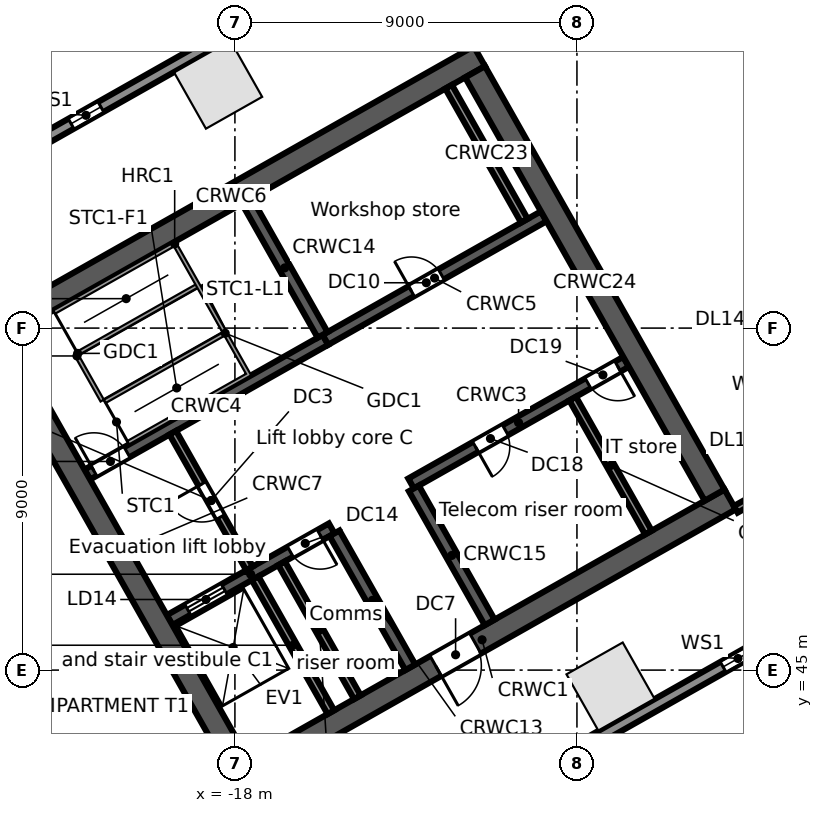
"""IFC4 building model, lengths in metres.
Left out: names, types, materials, properties, quantities, classifications, styles, units other than length and angle.
Written with IfcOpenShell. Run it as: python <this file> out.ifc"""

import sys

from ifc_helpers import new_model, si_unit, direction, frame, frame_2d, origin, origin_2d, place, context, subcontext, project, spatial, rectangle, extrude, element, fill, save


model = new_model("IFC4")
c1 = context("Model", 3, precision=1e-05, world=origin(), true_north=direction((0.0, 1.0)))
c2 = subcontext(c1, "Body", "Model", "MODEL_VIEW")
j1 = project(units=[si_unit("LENGTHUNIT", "METRE"), si_unit("PLANEANGLEUNIT", "RADIAN")], contexts=[c1])
p1 = place(None, origin())
s1 = spatial("IfcSite", under=j1, at=p1, CompositionType="ELEMENT")
p2 = place(p1, origin())
s2 = spatial("IfcBuilding", under=s1, at=p2, CompositionType="ELEMENT")
p3 = place(p2, frame((0.0, 0.0, 71.5)))
s3 = spatial("IfcBuildingStorey", under=s2, at=p3, CompositionType="ELEMENT", Elevation=71.5)
for number, where, z_axis, x_axis in (
    (1, (-18.441, 60.406, 0.0), (0.0, 0.0, 1.0), (-0.87, -0.492, 0.0)),
    (2, (-8.117, 44.568, 0.0), (0.0, 0.0, 1.0), (0.87, 0.492, 0.0)),
):
    element("IfcColumn", number, at=place(p3, frame(where, z_axis=z_axis, x_axis=x_axis)), inside=s3, PredefinedType="COLUMN", context=c2, shape_type="SweptSolid", body=[
        extrude(rectangle(XDim=1.7, YDim=1.7, at=origin_2d()), origin(), (0.0, 0.0, 1.0), 5.0),
    ])
p4 = place(p3, frame((-58.745, 38.764, 0.0), z_axis=(0.0, 0.0, 1.0), x_axis=(0.870355811726, 0.492423355453, 0.0)))
e3 = element("IfcWall", 3, at=p4, inside=s3, PredefinedType="STANDARD", context=c2, shape_type="SweptSolid", body=[
    extrude(rectangle(XDim=64.025, YDim=0.3, at=frame_2d((32.013, 0.0))), origin(), (0.0, 0.0, 1.0), 4.68),
])
p5 = place(p4, frame((60.122, 0.0, 0.6)))
e4 = element("IfcOpeningElement", 4, at=p5, cuts=e3, PredefinedType="OPENING", context=c2, shape_type="SweptSolid", body=[
    extrude(rectangle(XDim=0.9, YDim=3.2, at=frame_2d((0.45, 1.6))), frame((0.0, 0.16, 0.0), z_axis=(0.0, -1.0, 0.0), x_axis=(1.0, 0.0, 0.0)), (0.0, 0.0, 1.0), 0.32),
])
p6 = place(p4, frame((50.992, 0.0, 0.6)))
e5 = element("IfcOpeningElement", 5, at=p6, cuts=e3, PredefinedType="OPENING", context=c2, shape_type="SweptSolid", body=[
    extrude(rectangle(XDim=0.9, YDim=3.2, at=frame_2d((0.45, 1.6))), frame((0.0, 0.16, 0.0), z_axis=(0.0, -1.0, 0.0), x_axis=(1.0, 0.0, 0.0)), (0.0, 0.0, 1.0), 0.32),
])
p7 = place(p4, frame((41.862, 0.0, 0.6)))
e6 = element("IfcOpeningElement", 6, at=p7, cuts=e3, PredefinedType="OPENING", context=c2, shape_type="SweptSolid", body=[
    extrude(rectangle(XDim=0.9, YDim=3.2, at=frame_2d((0.45, 1.6))), frame((0.0, 0.16, 0.0), z_axis=(0.0, -1.0, 0.0), x_axis=(1.0, 0.0, 0.0)), (0.0, 0.0, 1.0), 0.32),
])
p8 = place(p4, frame((32.732, 0.0, 0.6)))
e7 = element("IfcOpeningElement", 7, at=p8, cuts=e3, PredefinedType="OPENING", context=c2, shape_type="SweptSolid", body=[
    extrude(rectangle(XDim=0.9, YDim=3.2, at=frame_2d((0.45, 1.6))), frame((0.0, 0.16, 0.0), z_axis=(0.0, -1.0, 0.0), x_axis=(1.0, 0.0, 0.0)), (0.0, 0.0, 1.0), 0.32),
])
p9 = place(p4, frame((23.602, 0.0, 0.6)))
e8 = element("IfcOpeningElement", 8, at=p9, cuts=e3, PredefinedType="OPENING", context=c2, shape_type="SweptSolid", body=[
    extrude(rectangle(XDim=0.9, YDim=3.2, at=frame_2d((0.45, 1.6))), frame((0.0, 0.16, 0.0), z_axis=(0.0, -1.0, 0.0), x_axis=(1.0, 0.0, 0.0)), (0.0, 0.0, 1.0), 0.32),
])
p10 = place(p4, frame((14.472, 0.0, 0.6)))
e9 = element("IfcOpeningElement", 9, at=p10, cuts=e3, PredefinedType="OPENING", context=c2, shape_type="SweptSolid", body=[
    extrude(rectangle(XDim=0.9, YDim=3.2, at=frame_2d((0.45, 1.6))), frame((0.0, 0.16, 0.0), z_axis=(0.0, -1.0, 0.0), x_axis=(1.0, 0.0, 0.0)), (0.0, 0.0, 1.0), 0.32),
])
p11 = place(p4, frame((5.342, 0.0, 0.6)))
e10 = element("IfcOpeningElement", 10, at=p11, cuts=e3, PredefinedType="OPENING", context=c2, shape_type="SweptSolid", body=[
    extrude(rectangle(XDim=0.9, YDim=3.2, at=frame_2d((0.45, 1.6))), frame((0.0, 0.16, 0.0), z_axis=(0.0, -1.0, 0.0), x_axis=(1.0, 0.0, 0.0)), (0.0, 0.0, 1.0), 0.32),
])
p12 = place(p3, frame((-0.055, 47.969, 0.0), z_axis=(0.0, 0.0, 1.0), x_axis=(-0.870355730478, -0.492423499058, 0.0)))
e11 = element("IfcWall", 11, at=p12, inside=s3, PredefinedType="STANDARD", context=c2, shape_type="SweptSolid", body=[
    extrude(rectangle(XDim=43.75, YDim=0.3, at=frame_2d((21.875, 0.0))), origin(), (0.0, 0.0, 1.0), 4.68),
])
p13 = place(p12, frame((39.977, 0.0, 0.6)))
e12 = element("IfcOpeningElement", 12, at=p13, cuts=e11, PredefinedType="OPENING", context=c2, shape_type="SweptSolid", body=[
    extrude(rectangle(XDim=0.9, YDim=3.2, at=frame_2d((0.45, 1.6))), frame((0.0, 0.16, 0.0), z_axis=(0.0, -1.0, 0.0), x_axis=(1.0, 0.0, 0.0)), (0.0, 0.0, 1.0), 0.32),
])
p14 = place(p12, frame((31.222, 0.0, 0.6)))
e13 = element("IfcOpeningElement", 13, at=p14, cuts=e11, PredefinedType="OPENING", context=c2, shape_type="SweptSolid", body=[
    extrude(rectangle(XDim=0.9, YDim=3.2, at=frame_2d((0.45, 1.6))), frame((0.0, 0.16, 0.0), z_axis=(0.0, -1.0, 0.0), x_axis=(1.0, 0.0, 0.0)), (0.0, 0.0, 1.0), 0.32),
])
p15 = place(p12, frame((22.468, 0.0, 0.6)))
e14 = element("IfcOpeningElement", 14, at=p15, cuts=e11, PredefinedType="OPENING", context=c2, shape_type="SweptSolid", body=[
    extrude(rectangle(XDim=0.9, YDim=3.2, at=frame_2d((0.45, 1.6))), frame((0.0, 0.16, 0.0), z_axis=(0.0, -1.0, 0.0), x_axis=(1.0, 0.0, 0.0)), (0.0, 0.0, 1.0), 0.32),
])
p16 = place(p12, frame((13.713, 0.0, 0.6)))
e15 = element("IfcOpeningElement", 15, at=p16, cuts=e11, PredefinedType="OPENING", context=c2, shape_type="SweptSolid", body=[
    extrude(rectangle(XDim=0.9, YDim=3.2, at=frame_2d((0.45, 1.6))), frame((0.0, 0.16, 0.0), z_axis=(0.0, -1.0, 0.0), x_axis=(1.0, 0.0, 0.0)), (0.0, 0.0, 1.0), 0.32),
])
p17 = place(p12, frame((4.959, 0.0, 0.6)))
e16 = element("IfcOpeningElement", 16, at=p17, cuts=e11, PredefinedType="OPENING", context=c2, shape_type="SweptSolid", body=[
    extrude(rectangle(XDim=0.9, YDim=3.2, at=frame_2d((0.45, 1.6))), frame((0.0, 0.16, 0.0), z_axis=(0.0, -1.0, 0.0), x_axis=(1.0, 0.0, 0.0)), (0.0, 0.0, 1.0), 0.32),
])
p18 = place(p3, frame((-18.024, 42.104, 0.0), z_axis=(0.0, 0.0, 1.0), x_axis=(0.870360574057, 0.492414937962, 0.0)))
e17 = element("IfcWall", 17, at=p18, inside=s3, PredefinedType="SOLIDWALL", context=c2, shape_type="SweptSolid", body=[
    extrude(rectangle(XDim=15.0, YDim=0.6, at=frame_2d((7.5, 0.0))), origin(), (0.0, 0.0, 1.0), 4.68),
])
p19 = place(p18, frame((6.1, 0.0, 0.0)))
e18 = element("IfcOpeningElement", 18, at=p19, cuts=e17, PredefinedType="OPENING", context=c2, shape_type="SweptSolid", body=[
    extrude(rectangle(XDim=1.2, YDim=2.1, at=frame_2d((0.6, 1.05))), frame((0.0, 0.31, 0.0), z_axis=(0.0, -1.0, 0.0), x_axis=(1.0, 0.0, 0.0)), (0.0, 0.0, 1.0), 0.62),
])
p20 = place(p3, frame((-19.718, 46.316, 0.0), z_axis=(0.0, 0.0, 1.0), x_axis=(0.870353963862, 0.492426621528, 0.0)))
e19 = element("IfcWall", 19, at=p20, inside=s3, PredefinedType="SOLIDWALL", context=c2, shape_type="SweptSolid", body=[
    extrude(rectangle(XDim=4.9, YDim=0.3, at=frame_2d((2.45, 0.0))), origin(), (0.0, 0.0, 1.0), 4.68),
])
p21 = place(p20, frame((0.55, 0.0, 0.0)))
e20 = element("IfcOpeningElement", 20, at=p21, cuts=e19, PredefinedType="OPENING", context=c2, shape_type="SweptSolid", body=[
    extrude(rectangle(XDim=1.1, YDim=2.1, at=frame_2d((0.55, 1.05))), frame((0.0, 0.16, 0.0), z_axis=(0.0, -1.0, 0.0), x_axis=(1.0, 0.0, 0.0)), (0.0, 0.0, 1.0), 0.32),
])
p22 = place(p20, frame((3.65, 0.0, 0.0)))
e21 = element("IfcOpeningElement", 21, at=p22, cuts=e19, PredefinedType="OPENING", context=c2, shape_type="SweptSolid", body=[
    extrude(rectangle(XDim=0.9, YDim=2.1, at=frame_2d((0.45, 1.05))), frame((0.0, 0.16, 0.0), z_axis=(0.0, -1.0, 0.0), x_axis=(1.0, 0.0, 0.0)), (0.0, 0.0, 1.0), 0.32),
])
p23 = place(p3, frame((-13.365, 49.911, 0.0), z_axis=(0.0, 0.0, 1.0), x_axis=(0.870340995471, 0.49244954219, 0.0)))
e22 = element("IfcWall", 22, at=p23, inside=s3, PredefinedType="SOLIDWALL", context=c2, shape_type="SweptSolid", body=[
    extrude(rectangle(XDim=6.5, YDim=0.3, at=frame_2d((3.25, 0.0))), origin(), (0.0, 0.0, 1.0), 4.68),
])
p24 = place(p23, frame((1.95, 0.0, 0.0)))
e23 = element("IfcOpeningElement", 23, at=p24, cuts=e22, PredefinedType="OPENING", context=c2, shape_type="SweptSolid", body=[
    extrude(rectangle(XDim=0.9, YDim=2.1, at=frame_2d((0.45, 1.05))), frame((0.0, 0.16, 0.0), z_axis=(0.0, -1.0, 0.0), x_axis=(1.0, 0.0, 0.0)), (0.0, 0.0, 1.0), 0.32),
])
p25 = place(p23, frame((5.35, 0.0, 0.0)))
e24 = element("IfcOpeningElement", 24, at=p25, cuts=e22, PredefinedType="OPENING", context=c2, shape_type="SweptSolid", body=[
    extrude(rectangle(XDim=0.9, YDim=2.1, at=frame_2d((0.45, 1.05))), frame((0.0, 0.16, 0.0), z_axis=(0.0, -1.0, 0.0), x_axis=(1.0, 0.0, 0.0)), (0.0, 0.0, 1.0), 0.32),
])
p26 = place(p3, frame((-21.885, 50.146, 0.0), z_axis=(0.0, 0.0, 1.0), x_axis=(0.870359411463, 0.492416992881, 0.0)))
e25 = element("IfcWall", 25, at=p26, inside=s3, PredefinedType="SOLIDWALL", context=c2, shape_type="SweptSolid", body=[
    extrude(rectangle(XDim=7.2, YDim=0.3, at=frame_2d((3.6, 0.0))), origin(), (0.0, 0.0, 1.0), 4.68),
])
p27 = place(p26, frame((0.2, 0.0, 0.0)))
e26 = element("IfcOpeningElement", 26, at=p27, cuts=e25, PredefinedType="OPENING", context=c2, shape_type="SweptSolid", body=[
    extrude(rectangle(XDim=1.0, YDim=2.1, at=frame_2d((0.5, 1.05))), frame((0.0, 0.16, 0.0), z_axis=(0.0, -1.0, 0.0), x_axis=(1.0, 0.0, 0.0)), (0.0, 0.0, 1.0), 0.32),
])
p28 = place(p3, frame((-15.618, 53.691, 0.0), z_axis=(0.0, 0.0, 1.0), x_axis=(0.870356769198, 0.492421663121, 0.0)))
e27 = element("IfcWall", 27, at=p28, inside=s3, PredefinedType="SOLIDWALL", context=c2, shape_type="SweptSolid", body=[
    extrude(rectangle(XDim=6.6, YDim=0.3, at=frame_2d((3.3, 0.0))), origin(), (0.0, 0.0, 1.0), 4.68),
])
p29 = place(p28, frame((2.6, 0.0, 0.0)))
e28 = element("IfcOpeningElement", 28, at=p29, cuts=e27, PredefinedType="OPENING", context=c2, shape_type="SweptSolid", body=[
    extrude(rectangle(XDim=0.9, YDim=2.1, at=frame_2d((0.45, 1.05))), frame((0.0, 0.16, 0.0), z_axis=(0.0, -1.0, 0.0), x_axis=(1.0, 0.0, 0.0)), (0.0, 0.0, 1.0), 0.32),
])
p30 = place(p3, frame((-24.623, 53.767, 0.0), z_axis=(0.0, 0.0, 1.0), x_axis=(0.870356627484, 0.492421913601, 0.0)))
e29 = element("IfcWall", 29, at=p30, inside=s3, PredefinedType="SOLIDWALL", context=c2, shape_type="SweptSolid", body=[
    extrude(rectangle(XDim=15.0, YDim=0.6, at=frame_2d((7.5, 0.0))), origin(), (0.0, 0.0, 1.0), 4.68),
])
p31 = place(p3, frame((-24.214, 53.654, 0.0), z_axis=(0.0, 0.0, 1.0), x_axis=(0.492441221355, -0.870345703448, 0.0)))
e30 = element("IfcWall", 30, at=p31, inside=s3, PredefinedType="SOLIDWALL", context=c2, shape_type="SweptSolid", body=[
    extrude(rectangle(XDim=12.8, YDim=0.6, at=frame_2d((6.4, 0.0))), origin(), (0.0, 0.0, 1.0), 4.68),
])
p32 = place(p3, frame((-17.469, 47.417, 0.0), z_axis=(0.0, 0.0, 1.0), x_axis=(0.492440575896, -0.870346068648, 0.0)))
e31 = element("IfcWall", 31, at=p32, inside=s3, PredefinedType="SOLIDWALL", context=c2, shape_type="SweptSolid", body=[
    extrude(rectangle(XDim=4.05, YDim=0.2, at=frame_2d((2.025, 0.0))), origin(), (0.0, 0.0, 1.0), 4.68),
])
p33 = place(p3, frame((-19.635, 51.246, 0.0), z_axis=(0.0, 0.0, 1.0), x_axis=(0.492408451753, -0.87036424366, 0.0)))
e32 = element("IfcWall", 32, at=p33, inside=s3, PredefinedType="PARTITIONING", context=c2, shape_type="SweptSolid", body=[
    extrude(rectangle(XDim=4.1, YDim=0.2, at=frame_2d((2.05, 0.0))), origin(), (0.0, 0.0, 1.0), 4.68),
])
p34 = place(p33, frame((1.55, 0.0, 0.0)))
e33 = element("IfcOpeningElement", 33, at=p34, cuts=e32, PredefinedType="OPENING", context=c2, shape_type="SweptSolid", body=[
    extrude(rectangle(XDim=1.0, YDim=2.1, at=frame_2d((0.5, 1.05))), frame((0.0, 0.11, 0.0), z_axis=(0.0, -1.0, 0.0), x_axis=(1.0, 0.0, 0.0)), (0.0, 0.0, 1.0), 0.22),
])
p35 = place(p3, frame((-16.772, 47.811, 0.0), z_axis=(0.0, 0.0, 1.0), x_axis=(0.492440575896, -0.870346068648, 0.0)))
e34 = element("IfcWall", 34, at=p35, inside=s3, PredefinedType="SOLIDWALL", context=c2, shape_type="SweptSolid", body=[
    extrude(rectangle(XDim=4.05, YDim=0.2, at=frame_2d((2.025, 0.0))), origin(), (0.0, 0.0, 1.0), 4.68),
])
p36 = place(p3, frame((-15.379, 48.599, 0.0), z_axis=(0.0, 0.0, 1.0), x_axis=(0.492394910396, -0.870371904542, 0.0)))
e35 = element("IfcWall", 35, at=p36, inside=s3, PredefinedType="SOLIDWALL", context=c2, shape_type="SweptSolid", body=[
    extrude(rectangle(XDim=4.05, YDim=0.3, at=frame_2d((2.025, 0.0))), origin(), (0.0, 0.0, 1.0), 4.68),
])
p37 = place(p3, frame((-17.686, 57.347, 0.0), z_axis=(0.0, 0.0, 1.0), x_axis=(0.492420746998, -0.870357287513, 0.0)))
e36 = element("IfcWall", 36, at=p37, inside=s3, PredefinedType="SOLIDWALL", context=c2, shape_type="SweptSolid", body=[
    extrude(rectangle(XDim=4.05, YDim=0.3, at=frame_2d((2.025, 0.0))), origin(), (0.0, 0.0, 1.0), 4.68),
])
p38 = place(p3, frame((-13.291, 49.781, 0.0), z_axis=(0.0, 0.0, 1.0), x_axis=(0.492394910396, -0.870371904542, 0.0)))
e37 = element("IfcWall", 37, at=p38, inside=s3, PredefinedType="SOLIDWALL", context=c2, shape_type="SweptSolid", body=[
    extrude(rectangle(XDim=4.05, YDim=0.3, at=frame_2d((2.025, 0.0))), origin(), (0.0, 0.0, 1.0), 4.68),
])
p39 = place(p3, frame((-9.113, 52.144, 0.0), z_axis=(0.0, 0.0, 1.0), x_axis=(0.492394910396, -0.870371904542, 0.0)))
e38 = element("IfcWall", 38, at=p39, inside=s3, PredefinedType="PARTITIONING", context=c2, shape_type="SweptSolid", body=[
    extrude(rectangle(XDim=4.05, YDim=0.2, at=frame_2d((2.025, 0.0))), origin(), (0.0, 0.0, 1.0), 4.68),
])
p40 = place(p3, frame((-12.377, 60.351, 0.0), z_axis=(0.0, 0.0, 1.0), x_axis=(0.492440575896, -0.870346068648, 0.0)))
e39 = element("IfcWall", 39, at=p40, inside=s3, PredefinedType="SOLIDWALL", context=c2, shape_type="SweptSolid", body=[
    extrude(rectangle(XDim=4.05, YDim=0.2, at=frame_2d((2.025, 0.0))), origin(), (0.0, 0.0, 1.0), 4.68),
])
p41 = place(p3, frame((-11.681, 60.744, 0.0), z_axis=(0.0, 0.0, 1.0), x_axis=(0.492426772896, -0.870353878221, 0.0)))
e40 = element("IfcWall", 40, at=p41, inside=s3, PredefinedType="SOLIDWALL", context=c2, shape_type="SweptSolid", body=[
    extrude(rectangle(XDim=12.8, YDim=0.6, at=frame_2d((6.4, 0.0))), origin(), (0.0, 0.0, 1.0), 4.68),
])
p42 = place(p3, frame((-4.821, 49.23, 0.0), z_axis=(0.0, 0.0, 1.0), x_axis=(0.870371217631, 0.492396124598, 0.0)))
e41 = element("IfcWall", 41, at=p42, inside=s3, PredefinedType="PARTITIONING", context=c2, shape_type="SweptSolid", body=[
    extrude(rectangle(XDim=2.659, YDim=0.2, at=frame_2d((1.329, 0.0))), origin(), (0.0, 0.0, 1.0), 4.68),
])
p43 = place(p7, origin())
e42 = element("IfcWindow", 42, at=p43, inside=s3, PartitioningType="SINGLE_PANEL", PredefinedType="WINDOW", context=c2, shape_type="SweptSolid", body=[
    extrude(rectangle(XDim=0.9, YDim=3.2, at=frame_2d((0.45, 1.6))), frame((0.0, 0.03, 0.0), z_axis=(0.0, -1.0, 0.0), x_axis=(1.0, 0.0, 0.0)), (0.0, 0.0, 1.0), 0.06),
])
fill(e6, e42)
p44 = place(p17, origin())
e43 = element("IfcWindow", 43, at=p44, inside=s3, PartitioningType="SINGLE_PANEL", PredefinedType="WINDOW", context=c2, shape_type="SweptSolid", body=[
    extrude(rectangle(XDim=0.9, YDim=3.2, at=frame_2d((0.45, 1.6))), frame((0.0, 0.03, 0.0), z_axis=(0.0, -1.0, 0.0), x_axis=(1.0, 0.0, 0.0)), (0.0, 0.0, 1.0), 0.06),
])
fill(e16, e43)
p45 = place(p21, origin())
e44 = element("IfcDoor", 44, at=p45, inside=s3, OperationType="DOUBLE_DOOR_SLIDING", PredefinedType="DOOR", context=c2, shape_type="SweptSolid", body=[
    extrude(rectangle(XDim=1.1, YDim=2.1, at=frame_2d((0.55, 1.05))), frame((0.0, 0.025, 0.0), z_axis=(0.0, -1.0, 0.0), x_axis=(1.0, 0.0, 0.0)), (0.0, 0.0, 1.0), 0.05),
])
fill(e20, e44)
p46 = place(p27, origin())
e45 = element("IfcDoor", 45, at=p46, inside=s3, OperationType="SINGLE_SWING_LEFT", PredefinedType="DOOR", context=c2, shape_type="SweptSolid", body=[
    extrude(rectangle(XDim=1.0, YDim=2.1, at=frame_2d((0.5, 1.05))), frame((0.0, 0.025, 0.0), z_axis=(0.0, -1.0, 0.0), x_axis=(1.0, 0.0, 0.0)), (0.0, 0.0, 1.0), 0.05),
])
fill(e26, e45)
p47 = place(p34, frame((1.0, 0.0, 0.0), z_axis=(0.0, 0.0, 1.0), x_axis=(-1.0, 0.0, 0.0)))
e46 = element("IfcDoor", 46, at=p47, inside=s3, OperationType="SINGLE_SWING_RIGHT", PredefinedType="DOOR", context=c2, shape_type="SweptSolid", body=[
    extrude(rectangle(XDim=1.0, YDim=2.1, at=frame_2d((0.5, 1.05))), frame((0.0, 0.025, 0.0), z_axis=(0.0, -1.0, 0.0), x_axis=(1.0, 0.0, 0.0)), (0.0, 0.0, 1.0), 0.05),
])
fill(e33, e46)
p48 = place(p19, frame((1.2, 0.0, 0.0), z_axis=(0.0, 0.0, 1.0), x_axis=(-1.0, 0.0, 0.0)))
e47 = element("IfcDoor", 47, at=p48, inside=s3, OperationType="SINGLE_SWING_RIGHT", PredefinedType="DOOR", context=c2, shape_type="SweptSolid", body=[
    extrude(rectangle(XDim=1.2, YDim=2.1, at=frame_2d((0.6, 1.05))), frame((0.0, 0.025, 0.0), z_axis=(0.0, -1.0, 0.0), x_axis=(1.0, 0.0, 0.0)), (0.0, 0.0, 1.0), 0.05),
])
fill(e18, e47)
p49 = place(p29, origin())
e48 = element("IfcDoor", 48, at=p49, inside=s3, OperationType="SINGLE_SWING_LEFT", PredefinedType="DOOR", context=c2, shape_type="SweptSolid", body=[
    extrude(rectangle(XDim=0.9, YDim=2.1, at=frame_2d((0.45, 1.05))), frame((0.0, 0.025, 0.0), z_axis=(0.0, -1.0, 0.0), x_axis=(1.0, 0.0, 0.0)), (0.0, 0.0, 1.0), 0.05),
])
fill(e28, e48)
p50 = place(p22, frame((0.9, 0.0, 0.0), z_axis=(0.0, 0.0, 1.0), x_axis=(-1.0, 0.0, 0.0)))
e49 = element("IfcDoor", 49, at=p50, inside=s3, OperationType="SINGLE_SWING_LEFT", PredefinedType="DOOR", context=c2, shape_type="SweptSolid", body=[
    extrude(rectangle(XDim=0.9, YDim=2.1, at=frame_2d((0.45, 1.05))), frame((0.0, 0.025, 0.0), z_axis=(0.0, -1.0, 0.0), x_axis=(1.0, 0.0, 0.0)), (0.0, 0.0, 1.0), 0.05),
])
fill(e21, e49)
p51 = place(p24, frame((0.9, 0.0, 0.0), z_axis=(0.0, 0.0, 1.0), x_axis=(-1.0, 0.0, 0.0)))
e50 = element("IfcDoor", 50, at=p51, inside=s3, OperationType="SINGLE_SWING_RIGHT", PredefinedType="DOOR", context=c2, shape_type="SweptSolid", body=[
    extrude(rectangle(XDim=0.9, YDim=2.1, at=frame_2d((0.45, 1.05))), frame((0.0, 0.025, 0.0), z_axis=(0.0, -1.0, 0.0), x_axis=(1.0, 0.0, 0.0)), (0.0, 0.0, 1.0), 0.05),
])
fill(e23, e50)
p52 = place(p25, frame((0.9, 0.0, 0.0), z_axis=(0.0, 0.0, 1.0), x_axis=(-1.0, 0.0, 0.0)))
e51 = element("IfcDoor", 51, at=p52, inside=s3, OperationType="SINGLE_SWING_LEFT", PredefinedType="DOOR", context=c2, shape_type="SweptSolid", body=[
    extrude(rectangle(XDim=0.9, YDim=2.1, at=frame_2d((0.45, 1.05))), frame((0.0, 0.025, 0.0), z_axis=(0.0, -1.0, 0.0), x_axis=(1.0, 0.0, 0.0)), (0.0, 0.0, 1.0), 0.05),
])
fill(e24, e51)
save(model, sys.argv[1])
